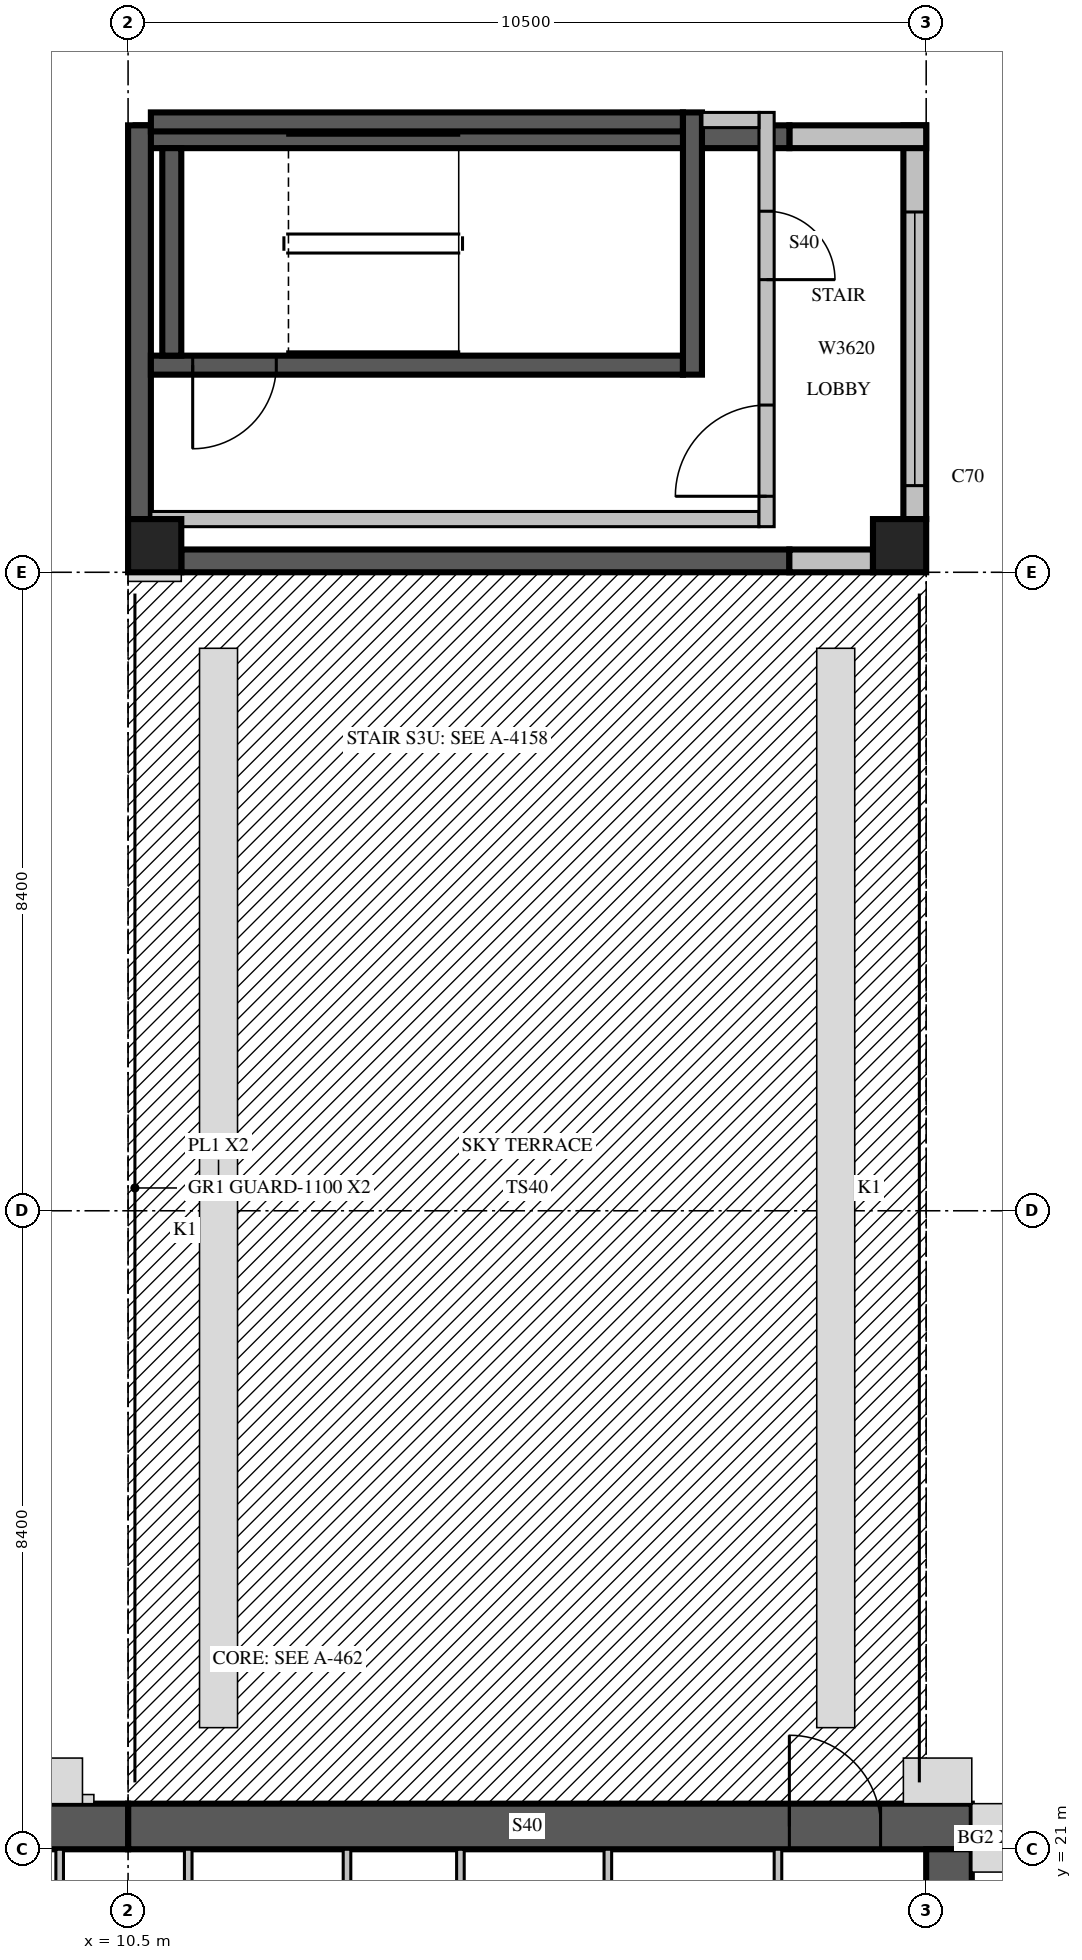
"""IFC4 building model, lengths in metres.
Left out: names, types, materials, properties, quantities, classifications, styles, units other than length and angle.
Written with IfcOpenShell. Run it as: python <this file> out.ifc"""

import sys

from ifc_helpers import new_model, si_unit, direction, frame, frame_2d, origin, origin_2d, place, context, subcontext, project, spatial, rectangle, extrude, source, transform, mapped, element, fill, save


model = new_model("IFC4")
c1 = context("Model", 3, precision=1e-05, world=origin(), true_north=direction((0.0, 1.0)))
c2 = subcontext(c1, "Body", "Model", "MODEL_VIEW")
j1 = project(units=[si_unit("LENGTHUNIT", "METRE"), si_unit("PLANEANGLEUNIT", "RADIAN")], contexts=[c1])
p1 = place(None, origin())
s1 = spatial("IfcSite", under=j1, at=p1, CompositionType="ELEMENT")
p2 = place(p1, origin())
s2 = spatial("IfcBuilding", under=s1, at=p2, CompositionType="ELEMENT")
p3 = place(p2, frame((0.0, 0.0, 309.0)))
s3 = spatial("IfcBuildingStorey", under=s2, at=p3, CompositionType="ELEMENT", Elevation=309.0)
m1 = source(origin(), c2, "Body", "SweptSolid", [
    extrude(rectangle(XDim=0.7, YDim=0.7, at=origin_2d()), origin(), (0.0, 0.0, 1.0), 3.5),
])
for number, where, z_axis, x_axis in (
    (1, (10.85, 38.15, 0.0), (0.0, 0.0, 1.0), (1.0, 0.0, 0.0)),
    (2, (20.65, 38.15, 0.0), (0.0, 0.0, 1.0), (1.0, 0.0, 0.0)),
):
    element("IfcColumn", number, at=place(p3, frame(where, z_axis=z_axis, x_axis=x_axis)), inside=s3, PredefinedType="COLUMN", context=c2, shape_type="MappedRepresentation", body=[
        mapped(m1, transform((0.0, 0.0, 0.0), scale=1.0)),
    ])
m2 = source(origin(), c2, "Body", "SweptSolid", [
    extrude(rectangle(XDim=11.1, YDim=0.6, at=frame_2d((5.55, 0.0))), origin(), (0.0, 0.0, 1.0), 3.5),
])
p4 = place(p3, frame((10.5, 21.3, 0.0), z_axis=(0.0, 0.0, 1.0), x_axis=(1.0, 0.0, 0.0)))
e3 = element("IfcWall", 3, at=p4, inside=s3, PredefinedType="SHEAR", context=c2, shape_type="MappedRepresentation", body=[
    mapped(m2, transform((0.0, 0.0, 0.0), scale=1.0)),
])
m3 = source(origin(), c2, "Body", "SweptSolid", [
    extrude(rectangle(XDim=1.2, YDim=2.1, at=frame_2d((0.6, 1.05))), frame((0.0, 0.31, 0.0), z_axis=(0.0, -1.0, 0.0), x_axis=(1.0, 0.0, 0.0)), (0.0, 0.0, 1.0), 0.62),
])
p5 = place(p4, frame((8.7, 0.0, 0.0)))
e4 = element("IfcOpeningElement", 4, at=p5, cuts=e3, PredefinedType="OPENING", context=c2, shape_type="MappedRepresentation", body=[
    mapped(m3, transform((0.0, 0.0, 0.0), scale=1.0)),
])
m4 = source(origin(), c2, "Body", "SweptSolid", [
    extrude(rectangle(XDim=10.5, YDim=0.6, at=frame_2d((5.25, 0.0))), origin(), (0.0, 0.0, 1.0), 3.5),
])
p6 = place(p3, frame((21.3, 10.5, 0.0), z_axis=(0.0, 0.0, 1.0), x_axis=(0.0, 1.0, 0.0)))
e5 = element("IfcWall", 5, at=p6, inside=s3, PredefinedType="SHEAR", context=c2, shape_type="MappedRepresentation", body=[
    mapped(m4, transform((0.0, 0.0, 0.0), scale=1.0)),
])
m5 = source(origin(), c2, "Body", "SweptSolid", [
    extrude(rectangle(XDim=1.2, YDim=2.4, at=frame_2d((0.6, 1.2))), frame((0.0, 0.31, 0.0), z_axis=(0.0, -1.0, 0.0), x_axis=(1.0, 0.0, 0.0)), (0.0, 0.0, 1.0), 0.62),
])
p7 = place(p6, frame((5.7, 0.0, 0.6)))
e6 = element("IfcOpeningElement", 6, at=p7, cuts=e5, PredefinedType="OPENING", context=c2, shape_type="MappedRepresentation", body=[
    mapped(m5, transform((0.0, 0.0, 0.0), scale=1.0)),
])
m6 = source(origin(), c2, "Body", "SweptSolid", [
    extrude(rectangle(XDim=6.6, YDim=0.6, at=frame_2d((3.3, 0.0))), origin(), (0.0, 0.0, 1.0), 3.5),
])
p8 = place(p3, frame((3.9, 21.3, 0.0), z_axis=(0.0, 0.0, 1.0), x_axis=(1.0, 0.0, 0.0)))
e7 = element("IfcWall", 7, at=p8, inside=s3, PredefinedType="SHEAR", context=c2, shape_type="MappedRepresentation", body=[
    mapped(m6, transform((0.0, 0.0, 0.0), scale=1.0)),
])
p9 = place(p8, frame((1.5, 0.0, 0.6)))
e8 = element("IfcOpeningElement", 8, at=p9, cuts=e7, PredefinedType="OPENING", context=c2, shape_type="MappedRepresentation", body=[
    mapped(m5, transform((0.0, 0.0, 0.0), scale=1.0)),
])
p10 = place(p8, frame((3.6, 0.0, 0.6)))
e9 = element("IfcOpeningElement", 9, at=p10, cuts=e7, PredefinedType="OPENING", context=c2, shape_type="MappedRepresentation", body=[
    mapped(m5, transform((0.0, 0.0, 0.0), scale=1.0)),
])
p11 = place(p3, frame((11.2, 37.95, 0.0), z_axis=(0.0, 0.0, 1.0), x_axis=(1.0, 0.0, 0.0)))
e10 = element("IfcWall", 10, at=p11, inside=s3, PredefinedType="SOLIDWALL", context=c2, shape_type="SweptSolid", body=[
    extrude(rectangle(XDim=8.0, YDim=0.3, at=frame_2d((4.0, 0.0))), origin(), (0.0, 0.0, 1.0), 3.1),
])
p12 = place(p3, frame((19.2, 37.95, 0.0), z_axis=(0.0, 0.0, 1.0), x_axis=(1.0, 0.0, 0.0)))
e11 = element("IfcWall", 11, at=p12, inside=s3, PredefinedType="STANDARD", context=c2, shape_type="SweptSolid", body=[
    extrude(rectangle(XDim=1.1, YDim=0.3, at=frame_2d((0.55, 0.0))), origin(), (0.0, 0.0, 1.0), 3.1),
])
p13 = place(p3, frame((20.85, 38.5, 0.0), z_axis=(0.0, 0.0, 1.0), x_axis=(0.0, 1.0, 0.0)))
e12 = element("IfcWall", 12, at=p13, inside=s3, PredefinedType="STANDARD", context=c2, shape_type="SweptSolid", body=[
    extrude(rectangle(XDim=5.18, YDim=0.3, at=frame_2d((2.59, 0.0))), origin(), (0.0, 0.0, 1.0), 3.1),
])
m7 = source(origin(), c2, "Body", "SweptSolid", [
    extrude(rectangle(XDim=3.6, YDim=2.0, at=frame_2d((1.8, 1.0))), frame((0.0, 0.16, 0.0), z_axis=(0.0, -1.0, 0.0), x_axis=(1.0, 0.0, 0.0)), (0.0, 0.0, 1.0), 0.32),
])
p14 = place(p13, frame((0.44, 0.0, 0.6)))
e13 = element("IfcOpeningElement", 13, at=p14, cuts=e12, PredefinedType="OPENING", context=c2, shape_type="MappedRepresentation", body=[
    mapped(m7, transform((0.0, 0.0, 0.0), scale=1.0)),
])
m8 = source(origin(), c2, "Body", "SweptSolid", [
    extrude(rectangle(XDim=1.8, YDim=0.3, at=frame_2d((0.9, 0.0))), origin(), (0.0, 0.0, 1.0), 3.1),
])
p15 = place(p3, frame((21.0, 43.53, 0.0), z_axis=(0.0, 0.0, 1.0), x_axis=(-1.0, 0.0, 0.0)))
e14 = element("IfcWall", 14, at=p15, inside=s3, PredefinedType="STANDARD", context=c2, shape_type="MappedRepresentation", body=[
    mapped(m8, transform((0.0, 0.0, 0.0), scale=1.0)),
])
m9 = source(origin(), c2, "Body", "SweptSolid", [
    extrude(rectangle(XDim=8.6, YDim=0.3, at=frame_2d((4.3, 0.0))), origin(), (0.0, 0.0, 1.0), 3.1),
])
p16 = place(p3, frame((19.2, 43.53, 0.0), z_axis=(0.0, 0.0, 1.0), x_axis=(-1.0, 0.0, 0.0)))
e15 = element("IfcWall", 15, at=p16, inside=s3, PredefinedType="SOLIDWALL", context=c2, shape_type="MappedRepresentation", body=[
    mapped(m9, transform((0.0, 0.0, 0.0), scale=1.0)),
])
p17 = place(p3, frame((10.65, 43.68, 0.0), z_axis=(0.0, 0.0, 1.0), x_axis=(0.0, -1.0, 0.0)))
e16 = element("IfcWall", 16, at=p17, inside=s3, PredefinedType="SOLIDWALL", context=c2, shape_type="SweptSolid", body=[
    extrude(rectangle(XDim=5.18, YDim=0.3, at=frame_2d((2.59, 0.0))), origin(), (0.0, 0.0, 1.0), 3.1),
])
m10 = source(origin(), c2, "Body", "SweptSolid", [
    extrude(rectangle(XDim=1.3, YDim=0.1, at=frame_2d((0.65, 0.0))), origin(), (0.0, 0.0, 1.0), 3.1),
])
for number, where, z_axis, x_axis in (
    (17, (11.291, 19.7, 0.0), (0.0, 0.0, 1.0), (0.0, 1.0, 0.0)),
    (18, (13.38, 19.7, 0.0), (0.0, 0.0, 1.0), (0.0, 1.0, 0.0)),
    (19, (14.872, 19.7, 0.0), (0.0, 0.0, 1.0), (0.0, 1.0, 0.0)),
    (20, (16.812, 19.7, 0.0), (0.0, 0.0, 1.0), (0.0, 1.0, 0.0)),
    (21, (9.6, 19.7, 0.0), (0.0, 0.0, 1.0), (0.0, 1.0, 0.0)),
    (22, (19.05, 19.7, 0.0), (0.0, 0.0, 1.0), (0.0, 1.0, 0.0)),
):
    element("IfcWall", number, at=place(p3, frame(where, z_axis=z_axis, x_axis=x_axis)), inside=s3, PredefinedType="PARTITIONING", context=c2, shape_type="MappedRepresentation", body=[
        mapped(m10, transform((0.0, 0.0, 0.0), scale=1.0)),
    ])
m11 = source(origin(), c2, "Body", "SweptSolid", [
    extrude(rectangle(XDim=7.0, YDim=0.25, at=frame_2d((3.5, 0.0))), origin(), (0.0, 0.0, 1.0), 3.1),
])
p18 = place(p3, frame((10.8, 40.525, 0.0), z_axis=(0.0, 0.0, 1.0), x_axis=(1.0, 0.0, 0.0)))
e23 = element("IfcWall", 23, at=p18, inside=s3, PredefinedType="SOLIDWALL", context=c2, shape_type="MappedRepresentation", body=[
    mapped(m11, transform((0.0, 0.0, 0.0), scale=1.0)),
])
m12 = source(origin(), c2, "Body", "SweptSolid", [
    extrude(rectangle(XDim=1.1, YDim=2.1, at=frame_2d((0.55, 1.05))), frame((0.0, 0.135, 0.0), z_axis=(0.0, -1.0, 0.0), x_axis=(1.0, 0.0, 0.0)), (0.0, 0.0, 1.0), 0.27),
])
p19 = place(p18, frame((0.55, 0.0, 0.0)))
e24 = element("IfcOpeningElement", 24, at=p19, cuts=e23, PredefinedType="OPENING", context=c2, shape_type="MappedRepresentation", body=[
    mapped(m12, transform((0.0, 0.0, 0.0), scale=1.0)),
])
p20 = place(p3, frame((10.8, 43.725, 0.0), z_axis=(0.0, 0.0, 1.0), x_axis=(1.0, 0.0, 0.0)))
e25 = element("IfcWall", 25, at=p20, inside=s3, PredefinedType="SOLIDWALL", context=c2, shape_type="MappedRepresentation", body=[
    mapped(m11, transform((0.0, 0.0, 0.0), scale=1.0)),
])
m13 = source(origin(), c2, "Body", "SweptSolid", [
    extrude(rectangle(XDim=3.45, YDim=0.25, at=frame_2d((1.725, 0.0))), origin(), (0.0, 0.0, 1.0), 3.1),
])
p21 = place(p3, frame((17.925, 40.4, 0.0), z_axis=(0.0, 0.0, 1.0), x_axis=(0.0, 1.0, 0.0)))
e26 = element("IfcWall", 26, at=p21, inside=s3, PredefinedType="SOLIDWALL", context=c2, shape_type="MappedRepresentation", body=[
    mapped(m13, transform((0.0, 0.0, 0.0), scale=1.0)),
])
m14 = source(origin(), c2, "Body", "SweptSolid", [
    extrude(rectangle(XDim=2.73, YDim=0.25, at=frame_2d((1.365, 0.0))), origin(), (0.0, 0.0, 1.0), 3.1),
])
p22 = place(p3, frame((11.075, 40.65, 0.0), z_axis=(0.0, 0.0, 1.0), x_axis=(0.0, 1.0, 0.0)))
e27 = element("IfcWall", 27, at=p22, inside=s3, PredefinedType="SOLIDWALL", context=c2, shape_type="MappedRepresentation", body=[
    mapped(m14, transform((0.0, 0.0, 0.0), scale=1.0)),
])
m15 = source(origin(), c2, "Body", "SweptSolid", [
    extrude(rectangle(XDim=8.0, YDim=0.2, at=frame_2d((4.0, 0.0))), origin(), (0.0, 0.0, 1.0), 3.1),
])
p23 = place(p3, frame((10.8, 38.5, 0.0), z_axis=(0.0, 0.0, 1.0), x_axis=(1.0, 0.0, 0.0)))
e28 = element("IfcWall", 28, at=p23, inside=s3, PredefinedType="PARTITIONING", context=c2, shape_type="MappedRepresentation", body=[
    mapped(m15, transform((0.0, 0.0, 0.0), scale=1.0)),
])
m16 = source(origin(), c2, "Body", "SweptSolid", [
    extrude(rectangle(XDim=5.45, YDim=0.2, at=frame_2d((2.725, 0.0))), origin(), (0.0, 0.0, 1.0), 3.1),
])
p24 = place(p3, frame((18.9, 38.4, 0.0), z_axis=(0.0, 0.0, 1.0), x_axis=(0.0, 1.0, 0.0)))
e29 = element("IfcWall", 29, at=p24, inside=s3, PredefinedType="PARTITIONING", context=c2, shape_type="MappedRepresentation", body=[
    mapped(m16, transform((0.0, 0.0, 0.0), scale=1.0)),
])
m17 = source(origin(), c2, "Body", "SweptSolid", [
    extrude(rectangle(XDim=1.2, YDim=2.1, at=frame_2d((0.6, 1.05))), frame((0.0, 0.11, 0.0), z_axis=(0.0, -1.0, 0.0), x_axis=(1.0, 0.0, 0.0)), (0.0, 0.0, 1.0), 0.22),
])
p25 = place(p24, frame((0.4, 0.0, 0.0)))
e30 = element("IfcOpeningElement", 30, at=p25, cuts=e29, PredefinedType="OPENING", context=c2, shape_type="MappedRepresentation", body=[
    mapped(m17, transform((0.0, 0.0, 0.0), scale=1.0)),
])
m18 = source(origin(), c2, "Body", "SweptSolid", [
    extrude(rectangle(XDim=0.9, YDim=2.1, at=frame_2d((0.45, 1.05))), frame((0.0, 0.11, 0.0), z_axis=(0.0, -1.0, 0.0), x_axis=(1.0, 0.0, 0.0)), (0.0, 0.0, 1.0), 0.22),
])
p26 = place(p24, frame((3.25, 0.0, 0.0)))
e31 = element("IfcOpeningElement", 31, at=p26, cuts=e29, PredefinedType="OPENING", context=c2, shape_type="MappedRepresentation", body=[
    mapped(m18, transform((0.0, 0.0, 0.0), scale=1.0)),
])
m19 = source(origin(), c2, "Body", "SweptSolid", [
    extrude(rectangle(XDim=0.75, YDim=0.2, at=frame_2d((0.375, 0.0))), origin(), (0.0, 0.0, 1.0), 3.1),
])
p27 = place(p3, frame((18.05, 43.75, 0.0), z_axis=(0.0, 0.0, 1.0), x_axis=(1.0, 0.0, 0.0)))
e32 = element("IfcWall", 32, at=p27, inside=s3, PredefinedType="PARTITIONING", context=c2, shape_type="MappedRepresentation", body=[
    mapped(m19, transform((0.0, 0.0, 0.0), scale=1.0)),
])
m20 = source(origin(), c2, "Body", "SweptSolid", [
    extrude(rectangle(XDim=3.6, YDim=2.0, at=frame_2d((1.8, 1.0))), frame((0.0, 0.03, 0.0), z_axis=(0.0, -1.0, 0.0), x_axis=(1.0, 0.0, 0.0)), (0.0, 0.0, 1.0), 0.06),
])
p28 = place(p14, origin())
e33 = element("IfcWindow", 33, at=p28, inside=s3, PartitioningType="SINGLE_PANEL", PredefinedType="WINDOW", context=c2, shape_type="MappedRepresentation", body=[
    mapped(m20, transform((0.0, 0.0, 0.0), scale=1.0)),
])
fill(e13, e33)
m21 = source(origin(), c2, "Body", "SweptSolid", [
    extrude(rectangle(XDim=1.1, YDim=2.1, at=frame_2d((0.55, 1.05))), frame((0.0, 0.025, 0.0), z_axis=(0.0, -1.0, 0.0), x_axis=(1.0, 0.0, 0.0)), (0.0, 0.0, 1.0), 0.05),
])
p29 = place(p19, origin())
e34 = element("IfcDoor", 34, at=p29, inside=s3, OperationType="SINGLE_SWING_RIGHT", PredefinedType="DOOR", context=c2, shape_type="MappedRepresentation", body=[
    mapped(m21, transform((0.0, 0.0, 0.0), scale=1.0)),
])
fill(e24, e34)
m22 = source(origin(), c2, "Body", "SweptSolid", [
    extrude(rectangle(XDim=1.2, YDim=2.1, at=frame_2d((0.6, 1.05))), frame((0.0, 0.025, 0.0), z_axis=(0.0, -1.0, 0.0), x_axis=(1.0, 0.0, 0.0)), (0.0, 0.0, 1.0), 0.05),
])
p30 = place(p25, origin())
e35 = element("IfcDoor", 35, at=p30, inside=s3, OperationType="SINGLE_SWING_LEFT", PredefinedType="DOOR", context=c2, shape_type="MappedRepresentation", body=[
    mapped(m22, transform((0.0, 0.0, 0.0), scale=1.0)),
])
fill(e30, e35)
m23 = source(origin(), c2, "Body", "SweptSolid", [
    extrude(rectangle(XDim=0.9, YDim=2.1, at=frame_2d((0.45, 1.05))), frame((0.0, 0.025, 0.0), z_axis=(0.0, -1.0, 0.0), x_axis=(1.0, 0.0, 0.0)), (0.0, 0.0, 1.0), 0.05),
])
p31 = place(p26, origin())
e36 = element("IfcDoor", 36, at=p31, inside=s3, OperationType="SINGLE_SWING_RIGHT", PredefinedType="DOOR", context=c2, shape_type="MappedRepresentation", body=[
    mapped(m23, transform((0.0, 0.0, 0.0), scale=1.0)),
])
fill(e31, e36)
p32 = place(p5, origin())
e37 = element("IfcDoor", 37, at=p32, inside=s3, OperationType="SINGLE_SWING_LEFT", PredefinedType="DOOR", context=c2, shape_type="MappedRepresentation", body=[
    mapped(m22, transform((0.0, 0.0, 0.0), scale=1.0)),
])
fill(e4, e37)
save(model, sys.argv[1])
